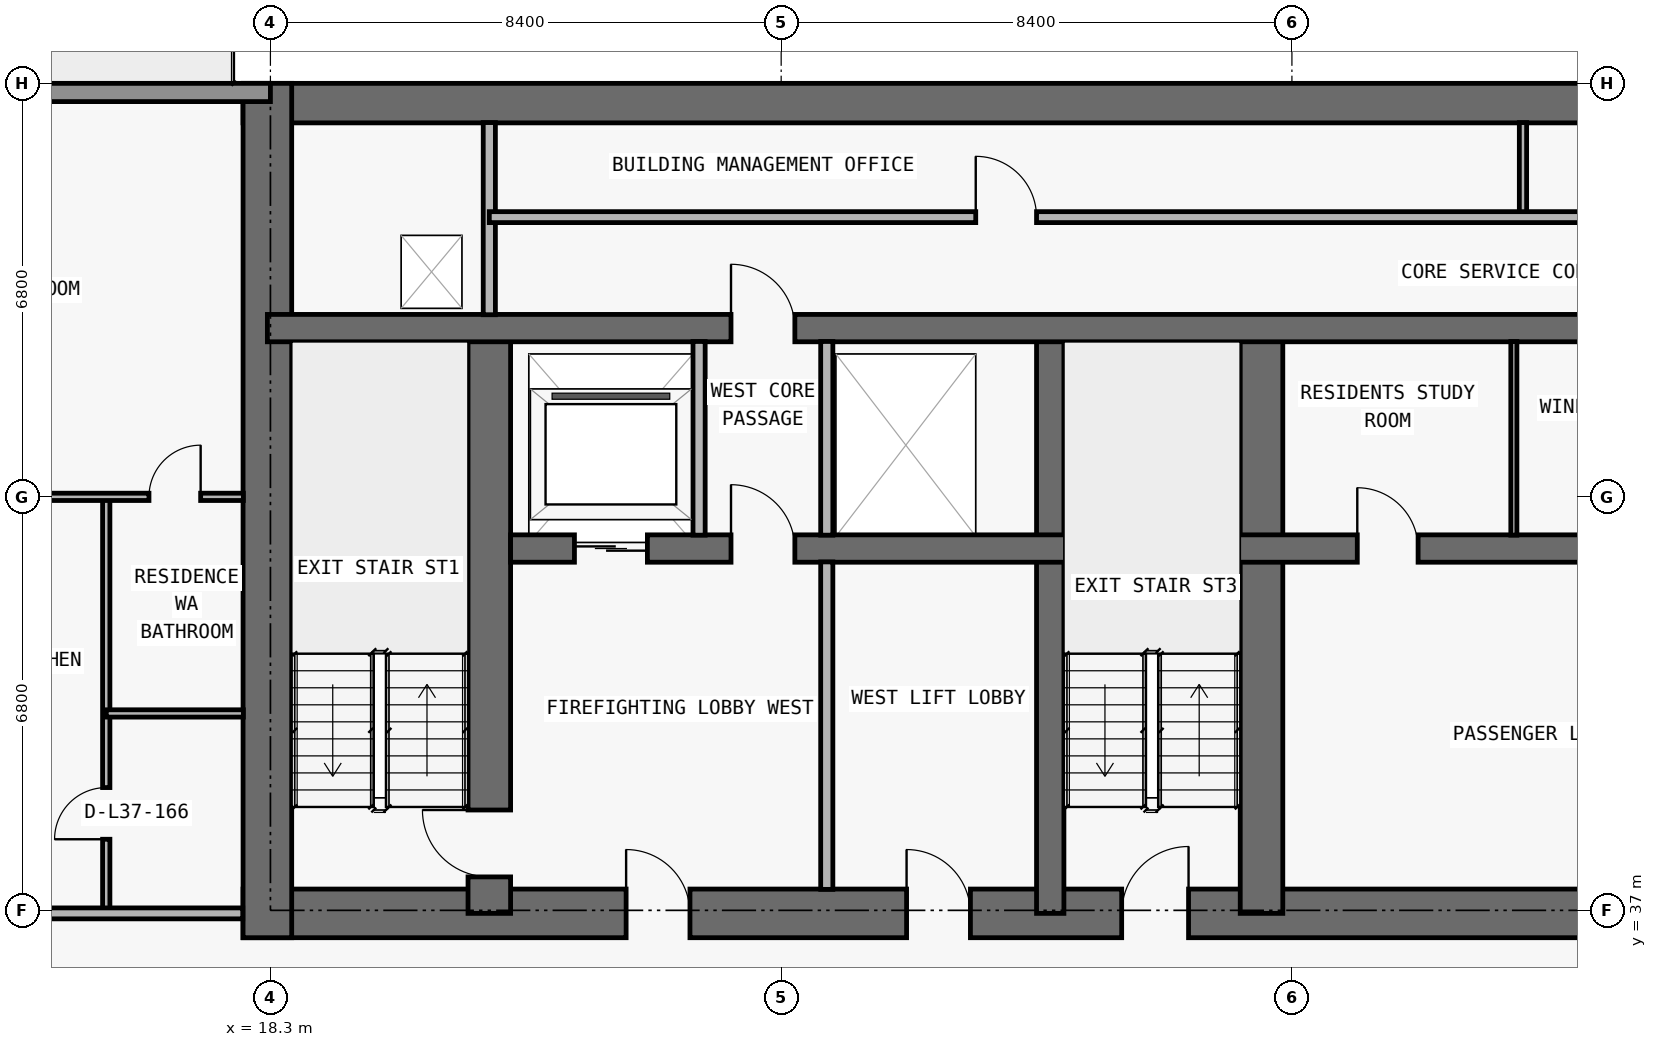
"""IFC4 building model, lengths in metres.
Left out: names, types, materials, properties, quantities, classifications, styles, units other than length and angle.
Written with IfcOpenShell. Run it as: python <this file> out.ifc"""

import sys

from ifc_helpers import new_model, si_unit, direction, frame, frame_2d, origin, place, context, subcontext, project, spatial, rectangle, extrude, element, fill, save


model = new_model("IFC4")
c1 = context("Model", 3, precision=1e-05, world=origin(), true_north=direction((0.0, 1.0)))
c2 = subcontext(c1, "Body", "Model", "MODEL_VIEW")
j1 = project(units=[si_unit("LENGTHUNIT", "METRE"), si_unit("PLANEANGLEUNIT", "RADIAN")], contexts=[c1])
p1 = place(None, origin())
s1 = spatial("IfcSite", under=j1, at=p1, CompositionType="ELEMENT")
p2 = place(p1, origin())
s2 = spatial("IfcBuilding", under=s1, at=p2, CompositionType="ELEMENT")
p3 = place(p2, frame((0.0, 0.0, 135.6)))
s3 = spatial("IfcBuildingStorey", under=s2, at=p3, CompositionType="ELEMENT", Elevation=135.6)
p4 = place(p3, frame((17.85, 36.95, 0.0), z_axis=(0.0, 0.0, 1.0), x_axis=(1.0, 0.0, 0.0)))
e1 = element("IfcWall", 1, at=p4, inside=s3, PredefinedType="SHEAR", context=c2, shape_type="SweptSolid", body=[
    extrude(rectangle(XDim=42.1, YDim=0.8, at=frame_2d((21.05, 0.0))), origin(), (0.0, 0.0, 1.0), 3.05),
])
p5 = place(p4, frame((14.45, 0.0, 0.0)))
e2 = element("IfcOpeningElement", 2, at=p5, cuts=e1, PredefinedType="OPENING", context=c2, shape_type="SweptSolid", body=[
    extrude(rectangle(XDim=1.1, YDim=2.15, at=frame_2d((0.55, 1.075))), frame((0.0, 0.41, 0.0), z_axis=(0.0, -1.0, 0.0), x_axis=(1.0, 0.0, 0.0)), (0.0, 0.0, 1.0), 0.82),
])
p6 = place(p4, frame((6.3, 0.0, 0.0)))
e3 = element("IfcOpeningElement", 3, at=p6, cuts=e1, PredefinedType="OPENING", context=c2, shape_type="SweptSolid", body=[
    extrude(rectangle(XDim=1.05, YDim=2.15, at=frame_2d((0.525, 1.075))), frame((0.0, 0.41, 0.0), z_axis=(0.0, -1.0, 0.0), x_axis=(1.0, 0.0, 0.0)), (0.0, 0.0, 1.0), 0.82),
])
p7 = place(p4, frame((34.8, 0.0, 0.0)))
e4 = element("IfcOpeningElement", 4, at=p7, cuts=e1, PredefinedType="OPENING", context=c2, shape_type="SweptSolid", body=[
    extrude(rectangle(XDim=1.05, YDim=2.15, at=frame_2d((0.525, 1.075))), frame((0.0, 0.41, 0.0), z_axis=(0.0, -1.0, 0.0), x_axis=(1.0, 0.0, 0.0)), (0.0, 0.0, 1.0), 0.82),
])
p8 = place(p4, frame((10.913, 0.0, 0.0)))
e5 = element("IfcOpeningElement", 5, at=p8, cuts=e1, PredefinedType="OPENING", context=c2, shape_type="SweptSolid", body=[
    extrude(rectangle(XDim=1.05, YDim=2.15, at=frame_2d((0.525, 1.075))), frame((0.0, 0.41, 0.0), z_axis=(0.0, -1.0, 0.0), x_axis=(1.0, 0.0, 0.0)), (0.0, 0.0, 1.0), 0.82),
])
p9 = place(p4, frame((24.15, 0.0, 0.0)))
e6 = element("IfcOpeningElement", 6, at=p9, cuts=e1, PredefinedType="OPENING", context=c2, shape_type="SweptSolid", body=[
    extrude(rectangle(XDim=1.05, YDim=2.15, at=frame_2d((0.525, 1.075))), frame((0.0, 0.41, 0.0), z_axis=(0.0, -1.0, 0.0), x_axis=(1.0, 0.0, 0.0)), (0.0, 0.0, 1.0), 0.82),
])
p10 = place(p3, frame((17.85, 50.275, 0.0), z_axis=(0.0, 0.0, 1.0), x_axis=(1.0, 0.0, 0.0)))
e7 = element("IfcWall", 7, at=p10, inside=s3, PredefinedType="SHEAR", context=c2, shape_type="SweptSolid", body=[
    extrude(rectangle(XDim=42.1, YDim=0.65, at=frame_2d((21.05, 0.0))), origin(), (0.0, 0.0, 1.0), 3.05),
])
p11 = place(p3, frame((18.25, 36.55, 0.0), z_axis=(0.0, 0.0, 1.0), x_axis=(0.0, 1.0, 0.0)))
e8 = element("IfcWall", 8, at=p11, inside=s3, PredefinedType="SHEAR", context=c2, shape_type="SweptSolid", body=[
    extrude(rectangle(XDim=14.05, YDim=0.8, at=frame_2d((7.025, 0.0))), origin(), (0.0, 0.0, 1.0), 3.05),
])
p12 = place(p3, frame((21.9, 36.95, 0.0), z_axis=(0.0, 0.0, 1.0), x_axis=(0.0, 1.0, 0.0)))
e9 = element("IfcWall", 9, at=p12, inside=s3, PredefinedType="SHEAR", context=c2, shape_type="SweptSolid", body=[
    extrude(rectangle(XDim=9.625, YDim=0.7, at=frame_2d((4.812, 0.0))), origin(), (0.0, 0.0, 1.0), 3.05),
])
p13 = place(p12, frame((0.6, 0.0, 0.0)))
e10 = element("IfcOpeningElement", 10, at=p13, cuts=e9, PredefinedType="OPENING", context=c2, shape_type="SweptSolid", body=[
    extrude(rectangle(XDim=1.1, YDim=2.15, at=frame_2d((0.55, 1.075))), frame((0.0, 0.36, 0.0), z_axis=(0.0, -1.0, 0.0), x_axis=(1.0, 0.0, 0.0)), (0.0, 0.0, 1.0), 0.72),
])
p14 = place(p3, frame((31.125, 36.95, 0.0), z_axis=(0.0, 0.0, 1.0), x_axis=(0.0, 1.0, 0.0)))
e11 = element("IfcWall", 11, at=p14, inside=s3, PredefinedType="SHEAR", context=c2, shape_type="SweptSolid", body=[
    extrude(rectangle(XDim=9.625, YDim=0.45, at=frame_2d((4.812, 0.0))), origin(), (0.0, 0.0, 1.0), 3.05),
])
p15 = place(p3, frame((34.6, 36.95, 0.0), z_axis=(0.0, 0.0, 1.0), x_axis=(0.0, 1.0, 0.0)))
e12 = element("IfcWall", 12, at=p15, inside=s3, PredefinedType="SHEAR", context=c2, shape_type="SweptSolid", body=[
    extrude(rectangle(XDim=9.625, YDim=0.7, at=frame_2d((4.812, 0.0))), origin(), (0.0, 0.0, 1.0), 3.05),
])
p16 = place(p3, frame((22.25, 42.95, 0.0), z_axis=(0.0, 0.0, 1.0), x_axis=(1.0, 0.0, 0.0)))
e13 = element("IfcWall", 13, at=p16, inside=s3, PredefinedType="SHEAR", context=c2, shape_type="SweptSolid", body=[
    extrude(rectangle(XDim=33.3, YDim=0.45, at=frame_2d((16.65, 0.0))), origin(), (0.0, 0.0, 1.0), 3.05),
])
p17 = place(p16, frame((1.05, 0.0, 0.0)))
e14 = element("IfcOpeningElement", 14, at=p17, cuts=e13, PredefinedType="OPENING", context=c2, shape_type="SweptSolid", body=[
    extrude(rectangle(XDim=1.2, YDim=2.2, at=frame_2d((0.6, 1.1))), frame((0.0, 0.235, 0.0), z_axis=(0.0, -1.0, 0.0), x_axis=(1.0, 0.0, 0.0)), (0.0, 0.0, 1.0), 0.47),
])
p18 = place(p16, frame((31.05, 0.0, 0.0)))
e15 = element("IfcOpeningElement", 15, at=p18, cuts=e13, PredefinedType="OPENING", context=c2, shape_type="SweptSolid", body=[
    extrude(rectangle(XDim=1.2, YDim=2.2, at=frame_2d((0.6, 1.1))), frame((0.0, 0.235, 0.0), z_axis=(0.0, -1.0, 0.0), x_axis=(1.0, 0.0, 0.0)), (0.0, 0.0, 1.0), 0.47),
])
p19 = place(p16, frame((21.4, 0.0, 0.0)))
e16 = element("IfcOpeningElement", 16, at=p19, cuts=e13, PredefinedType="OPENING", context=c2, shape_type="SweptSolid", body=[
    extrude(rectangle(XDim=1.1, YDim=2.2, at=frame_2d((0.55, 1.1))), frame((0.0, 0.235, 0.0), z_axis=(0.0, -1.0, 0.0), x_axis=(1.0, 0.0, 0.0)), (0.0, 0.0, 1.0), 0.47),
])
p20 = place(p16, frame((24.0, 0.0, 0.0)))
e17 = element("IfcOpeningElement", 17, at=p20, cuts=e13, PredefinedType="OPENING", context=c2, shape_type="SweptSolid", body=[
    extrude(rectangle(XDim=1.1, YDim=2.2, at=frame_2d((0.55, 1.1))), frame((0.0, 0.235, 0.0), z_axis=(0.0, -1.0, 0.0), x_axis=(1.0, 0.0, 0.0)), (0.0, 0.0, 1.0), 0.47),
])
p21 = place(p16, frame((3.625, 0.0, 0.0)))
e18 = element("IfcOpeningElement", 18, at=p21, cuts=e13, PredefinedType="OPENING", context=c2, shape_type="SweptSolid", body=[
    extrude(rectangle(XDim=1.05, YDim=2.15, at=frame_2d((0.525, 1.075))), frame((0.0, 0.235, 0.0), z_axis=(0.0, -1.0, 0.0), x_axis=(1.0, 0.0, 0.0)), (0.0, 0.0, 1.0), 0.47),
])
p22 = place(p16, frame((28.675, 0.0, 0.0)))
e19 = element("IfcOpeningElement", 19, at=p22, cuts=e13, PredefinedType="OPENING", context=c2, shape_type="SweptSolid", body=[
    extrude(rectangle(XDim=1.05, YDim=2.15, at=frame_2d((0.525, 1.075))), frame((0.0, 0.235, 0.0), z_axis=(0.0, -1.0, 0.0), x_axis=(1.0, 0.0, 0.0)), (0.0, 0.0, 1.0), 0.47),
])
p23 = place(p16, frame((13.925, 0.0, 0.0)))
e20 = element("IfcOpeningElement", 20, at=p23, cuts=e13, PredefinedType="OPENING", context=c2, shape_type="SweptSolid", body=[
    extrude(rectangle(XDim=1.0, YDim=2.2, at=frame_2d((0.5, 1.1))), frame((0.0, 0.235, 0.0), z_axis=(0.0, -1.0, 0.0), x_axis=(1.0, 0.0, 0.0)), (0.0, 0.0, 1.0), 0.47),
])
p24 = place(p16, frame((18.05, 0.0, 0.0)))
e21 = element("IfcOpeningElement", 21, at=p24, cuts=e13, PredefinedType="OPENING", context=c2, shape_type="SweptSolid", body=[
    extrude(rectangle(XDim=1.0, YDim=2.2, at=frame_2d((0.5, 1.1))), frame((0.0, 0.235, 0.0), z_axis=(0.0, -1.0, 0.0), x_axis=(1.0, 0.0, 0.0)), (0.0, 0.0, 1.0), 0.47),
])
p25 = place(p3, frame((18.25, 46.575, 0.0), z_axis=(0.0, 0.0, 1.0), x_axis=(1.0, 0.0, 0.0)))
e22 = element("IfcWall", 22, at=p25, inside=s3, PredefinedType="SHEAR", context=c2, shape_type="SweptSolid", body=[
    extrude(rectangle(XDim=41.3, YDim=0.45, at=frame_2d((20.65, 0.0))), origin(), (0.0, 0.0, 1.0), 3.05),
])
p26 = place(p25, frame((7.625, 0.0, 0.0)))
e23 = element("IfcOpeningElement", 23, at=p26, cuts=e22, PredefinedType="OPENING", context=c2, shape_type="SweptSolid", body=[
    extrude(rectangle(XDim=1.05, YDim=2.15, at=frame_2d((0.525, 1.075))), frame((0.0, 0.235, 0.0), z_axis=(0.0, -1.0, 0.0), x_axis=(1.0, 0.0, 0.0)), (0.0, 0.0, 1.0), 0.47),
])
p27 = place(p25, frame((32.675, 0.0, 0.0)))
e24 = element("IfcOpeningElement", 24, at=p27, cuts=e22, PredefinedType="OPENING", context=c2, shape_type="SweptSolid", body=[
    extrude(rectangle(XDim=1.05, YDim=2.15, at=frame_2d((0.525, 1.075))), frame((0.0, 0.235, 0.0), z_axis=(0.0, -1.0, 0.0), x_axis=(1.0, 0.0, 0.0)), (0.0, 0.0, 1.0), 0.47),
])
p28 = place(p3, frame((7.7, 50.45, 0.0), z_axis=(0.0, 0.0, 1.0), x_axis=(1.0, 0.0, 0.0)))
e25 = element("IfcWall", 25, at=p28, inside=s3, PredefinedType="STANDARD", context=c2, shape_type="SweptSolid", body=[
    extrude(rectangle(XDim=10.6, YDim=0.3, at=frame_2d((5.3, 0.0))), origin(), (0.0, 0.0, 1.0), 3.05),
])
p29 = place(p28, frame((4.3, 0.0, 0.0)))
e26 = element("IfcOpeningElement", 26, at=p29, cuts=e25, PredefinedType="OPENING", context=c2, shape_type="SweptSolid", body=[
    extrude(rectangle(XDim=2.0, YDim=2.3, at=frame_2d((1.0, 1.15))), frame((0.0, 0.16, 0.0), z_axis=(0.0, -1.0, 0.0), x_axis=(1.0, 0.0, 0.0)), (0.0, 0.0, 1.0), 0.32),
])
p30 = place(p3, frame((15.6, 36.95, 0.0), z_axis=(0.0, 0.0, 1.0), x_axis=(0.0, 1.0, 0.0)))
e27 = element("IfcWall", 27, at=p30, inside=s3, PredefinedType="PARTITIONING", context=c2, shape_type="SweptSolid", body=[
    extrude(rectangle(XDim=6.85, YDim=0.12, at=frame_2d((3.425, 0.0))), origin(), (0.0, 0.0, 1.0), 3.05),
])
p31 = place(p30, frame((1.219, 0.0, 0.0)))
e28 = element("IfcOpeningElement", 28, at=p31, cuts=e27, PredefinedType="OPENING", context=c2, shape_type="SweptSolid", body=[
    extrude(rectangle(XDim=0.85, YDim=2.1, at=frame_2d((0.425, 1.05))), frame((0.0, 0.07, 0.0), z_axis=(0.0, -1.0, 0.0), x_axis=(1.0, 0.0, 0.0)), (0.0, 0.0, 1.0), 0.14),
])
p32 = place(p3, frame((21.9, 46.795, 0.0), z_axis=(0.0, 0.0, 1.0), x_axis=(0.0, 1.0, 0.0)))
e29 = element("IfcWall", 29, at=p32, inside=s3, PredefinedType="PARTITIONING", context=c2, shape_type="SweptSolid", body=[
    extrude(rectangle(XDim=3.16, YDim=0.2, at=frame_2d((1.58, 0.0))), origin(), (0.0, 0.0, 1.0), 3.05),
])
p33 = place(p3, frame((25.35, 43.17, 0.0), z_axis=(0.0, 0.0, 1.0), x_axis=(0.0, 1.0, 0.0)))
e30 = element("IfcWall", 30, at=p33, inside=s3, PredefinedType="PARTITIONING", context=c2, shape_type="SweptSolid", body=[
    extrude(rectangle(XDim=3.185, YDim=0.2, at=frame_2d((1.593, 0.0))), origin(), (0.0, 0.0, 1.0), 3.05),
])
p34 = place(p3, frame((27.45, 37.345, 0.0), z_axis=(0.0, 0.0, 1.0), x_axis=(0.0, 1.0, 0.0)))
e31 = element("IfcWall", 31, at=p34, inside=s3, PredefinedType="PARTITIONING", context=c2, shape_type="SweptSolid", body=[
    extrude(rectangle(XDim=5.385, YDim=0.2, at=frame_2d((2.692, 0.0))), origin(), (0.0, 0.0, 1.0), 3.05),
])
p35 = place(p3, frame((27.45, 43.17, 0.0), z_axis=(0.0, 0.0, 1.0), x_axis=(0.0, 1.0, 0.0)))
e32 = element("IfcWall", 32, at=p35, inside=s3, PredefinedType="PARTITIONING", context=c2, shape_type="SweptSolid", body=[
    extrude(rectangle(XDim=3.185, YDim=0.2, at=frame_2d((1.593, 0.0))), origin(), (0.0, 0.0, 1.0), 3.05),
])
p36 = place(p3, frame((38.75, 43.17, 0.0), z_axis=(0.0, 0.0, 1.0), x_axis=(0.0, 1.0, 0.0)))
e33 = element("IfcWall", 33, at=p36, inside=s3, PredefinedType="MOVABLE", context=c2, shape_type="SweptSolid", body=[
    extrude(rectangle(XDim=3.185, YDim=0.1, at=frame_2d((1.593, 0.0))), origin(), (0.0, 0.0, 1.0), 3.05),
])
p37 = place(p3, frame((38.9, 48.4, 0.0), z_axis=(0.0, 0.0, 1.0), x_axis=(0.0, 1.0, 0.0)))
e34 = element("IfcWall", 34, at=p37, inside=s3, PredefinedType="PARTITIONING", context=c2, shape_type="SweptSolid", body=[
    extrude(rectangle(XDim=1.555, YDim=0.12, at=frame_2d((0.778, 0.0))), origin(), (0.0, 0.0, 1.0), 3.05),
])
p38 = place(p3, frame((7.7, 36.95, 0.0), z_axis=(0.0, 0.0, 1.0), x_axis=(1.0, 0.0, 0.0)))
e35 = element("IfcWall", 35, at=p38, inside=s3, PredefinedType="PARTITIONING", context=c2, shape_type="SweptSolid", body=[
    extrude(rectangle(XDim=10.145, YDim=0.18, at=frame_2d((5.073, 0.0))), origin(), (0.0, 0.0, 1.0), 3.05),
])
p39 = place(p38, frame((5.188, 0.0, 0.0)))
e36 = element("IfcOpeningElement", 36, at=p39, cuts=e35, PredefinedType="OPENING", context=c2, shape_type="SweptSolid", body=[
    extrude(rectangle(XDim=1.0, YDim=2.2, at=frame_2d((0.5, 1.1))), frame((0.0, 0.1, 0.0), z_axis=(0.0, -1.0, 0.0), x_axis=(1.0, 0.0, 0.0)), (0.0, 0.0, 1.0), 0.2),
])
p40 = place(p3, frame((15.6, 40.238, 0.0), z_axis=(0.0, 0.0, 1.0), x_axis=(1.0, 0.0, 0.0)))
e37 = element("IfcWall", 37, at=p40, inside=s3, PredefinedType="PARTITIONING", context=c2, shape_type="SweptSolid", body=[
    extrude(rectangle(XDim=2.255, YDim=0.12, at=frame_2d((1.127, 0.0))), origin(), (0.0, 0.0, 1.0), 3.05),
])
p41 = place(p3, frame((4.195, 43.8, 0.0), z_axis=(0.0, 0.0, 1.0), x_axis=(1.0, 0.0, 0.0)))
e38 = element("IfcWall", 38, at=p41, inside=s3, PredefinedType="PARTITIONING", context=c2, shape_type="SweptSolid", body=[
    extrude(rectangle(XDim=13.66, YDim=0.12, at=frame_2d((6.83, 0.0))), origin(), (0.0, 0.0, 1.0), 2.339),
])
p42 = place(p41, frame((8.743, 0.0, 0.0)))
e39 = element("IfcOpeningElement", 39, at=p42, cuts=e38, PredefinedType="OPENING", context=c2, shape_type="SweptSolid", body=[
    extrude(rectangle(XDim=0.9, YDim=2.15, at=frame_2d((0.45, 1.075))), frame((0.0, 0.07, 0.0), z_axis=(0.0, -1.0, 0.0), x_axis=(1.0, 0.0, 0.0)), (0.0, 0.0, 1.0), 0.14),
])
p43 = place(p41, frame((12.107, 0.0, 0.0)))
e40 = element("IfcOpeningElement", 40, at=p43, cuts=e38, PredefinedType="OPENING", context=c2, shape_type="SweptSolid", body=[
    extrude(rectangle(XDim=0.85, YDim=2.1, at=frame_2d((0.425, 1.05))), frame((0.0, 0.07, 0.0), z_axis=(0.0, -1.0, 0.0), x_axis=(1.0, 0.0, 0.0)), (0.0, 0.0, 1.0), 0.14),
])
p44 = place(p3, frame((21.9, 48.4, 0.0), z_axis=(0.0, 0.0, 1.0), x_axis=(1.0, 0.0, 0.0)))
e41 = element("IfcWall", 41, at=p44, inside=s3, PredefinedType="PARTITIONING", context=c2, shape_type="SweptSolid", body=[
    extrude(rectangle(XDim=33.986, YDim=0.18, at=frame_2d((16.993, 0.0))), origin(), (0.0, 0.0, 1.0), 3.05),
])
p45 = place(p44, frame((8.0, 0.0, 0.0)))
e42 = element("IfcOpeningElement", 42, at=p45, cuts=e41, PredefinedType="OPENING", context=c2, shape_type="SweptSolid", body=[
    extrude(rectangle(XDim=1.0, YDim=2.2, at=frame_2d((0.5, 1.1))), frame((0.0, 0.1, 0.0), z_axis=(0.0, -1.0, 0.0), x_axis=(1.0, 0.0, 0.0)), (0.0, 0.0, 1.0), 0.2),
])
p46 = place(p44, frame((24.993, 0.0, 0.0)))
e43 = element("IfcOpeningElement", 43, at=p46, cuts=e41, PredefinedType="OPENING", context=c2, shape_type="SweptSolid", body=[
    extrude(rectangle(XDim=1.0, YDim=2.2, at=frame_2d((0.5, 1.1))), frame((0.0, 0.1, 0.0), z_axis=(0.0, -1.0, 0.0), x_axis=(1.0, 0.0, 0.0)), (0.0, 0.0, 1.0), 0.2),
])
p47 = place(p17, origin())
e44 = element("IfcDoor", 44, at=p47, inside=s3, OperationType="DOUBLE_DOOR_SLIDING", PredefinedType="DOOR", context=c2, shape_type="SweptSolid", body=[
    extrude(rectangle(XDim=1.2, YDim=2.2, at=frame_2d((0.6, 1.1))), frame((0.0, 0.025, 0.0), z_axis=(0.0, -1.0, 0.0), x_axis=(1.0, 0.0, 0.0)), (0.0, 0.0, 1.0), 0.05),
])
fill(e14, e44)
p48 = place(p5, origin())
e45 = element("IfcDoor", 45, at=p48, inside=s3, OperationType="SINGLE_SWING_RIGHT", PredefinedType="DOOR", context=c2, shape_type="SweptSolid", body=[
    extrude(rectangle(XDim=1.1, YDim=2.15, at=frame_2d((0.55, 1.075))), frame((0.0, 0.025, 0.0), z_axis=(0.0, -1.0, 0.0), x_axis=(1.0, 0.0, 0.0)), (0.0, 0.0, 1.0), 0.05),
])
fill(e2, e45)
p49 = place(p6, origin())
e46 = element("IfcDoor", 46, at=p49, inside=s3, OperationType="SINGLE_SWING_LEFT", PredefinedType="DOOR", context=c2, shape_type="SweptSolid", body=[
    extrude(rectangle(XDim=1.05, YDim=2.15, at=frame_2d((0.525, 1.075))), frame((0.0, 0.025, 0.0), z_axis=(0.0, -1.0, 0.0), x_axis=(1.0, 0.0, 0.0)), (0.0, 0.0, 1.0), 0.05),
])
fill(e3, e46)
p50 = place(p13, origin())
e47 = element("IfcDoor", 47, at=p50, inside=s3, OperationType="SINGLE_SWING_RIGHT", PredefinedType="DOOR", context=c2, shape_type="SweptSolid", body=[
    extrude(rectangle(XDim=1.1, YDim=2.15, at=frame_2d((0.55, 1.075))), frame((0.0, 0.025, 0.0), z_axis=(0.0, -1.0, 0.0), x_axis=(1.0, 0.0, 0.0)), (0.0, 0.0, 1.0), 0.05),
])
fill(e10, e47)
p51 = place(p21, origin())
e48 = element("IfcDoor", 48, at=p51, inside=s3, OperationType="SINGLE_SWING_LEFT", PredefinedType="DOOR", context=c2, shape_type="SweptSolid", body=[
    extrude(rectangle(XDim=1.05, YDim=2.15, at=frame_2d((0.525, 1.075))), frame((0.0, 0.025, 0.0), z_axis=(0.0, -1.0, 0.0), x_axis=(1.0, 0.0, 0.0)), (0.0, 0.0, 1.0), 0.05),
])
fill(e18, e48)
p52 = place(p8, origin())
e49 = element("IfcDoor", 49, at=p52, inside=s3, OperationType="SINGLE_SWING_LEFT", PredefinedType="DOOR", context=c2, shape_type="SweptSolid", body=[
    extrude(rectangle(XDim=1.05, YDim=2.15, at=frame_2d((0.525, 1.075))), frame((0.0, 0.025, 0.0), z_axis=(0.0, -1.0, 0.0), x_axis=(1.0, 0.0, 0.0)), (0.0, 0.0, 1.0), 0.05),
])
fill(e5, e49)
p53 = place(p23, origin())
e50 = element("IfcDoor", 50, at=p53, inside=s3, OperationType="SINGLE_SWING_LEFT", PredefinedType="DOOR", context=c2, shape_type="SweptSolid", body=[
    extrude(rectangle(XDim=1.0, YDim=2.2, at=frame_2d((0.5, 1.1))), frame((0.0, 0.025, 0.0), z_axis=(0.0, -1.0, 0.0), x_axis=(1.0, 0.0, 0.0)), (0.0, 0.0, 1.0), 0.05),
])
fill(e20, e50)
p54 = place(p26, origin())
e51 = element("IfcDoor", 51, at=p54, inside=s3, OperationType="SINGLE_SWING_LEFT", PredefinedType="DOOR", context=c2, shape_type="SweptSolid", body=[
    extrude(rectangle(XDim=1.05, YDim=2.15, at=frame_2d((0.525, 1.075))), frame((0.0, 0.025, 0.0), z_axis=(0.0, -1.0, 0.0), x_axis=(1.0, 0.0, 0.0)), (0.0, 0.0, 1.0), 0.05),
])
fill(e23, e51)
p55 = place(p45, origin())
e52 = element("IfcDoor", 52, at=p55, inside=s3, OperationType="SINGLE_SWING_LEFT", PredefinedType="DOOR", context=c2, shape_type="SweptSolid", body=[
    extrude(rectangle(XDim=1.0, YDim=2.2, at=frame_2d((0.5, 1.1))), frame((0.0, 0.025, 0.0), z_axis=(0.0, -1.0, 0.0), x_axis=(1.0, 0.0, 0.0)), (0.0, 0.0, 1.0), 0.05),
])
fill(e42, e52)
p56 = place(p31, origin())
e53 = element("IfcDoor", 53, at=p56, inside=s3, OperationType="SINGLE_SWING_LEFT", PredefinedType="DOOR", context=c2, shape_type="SweptSolid", body=[
    extrude(rectangle(XDim=0.85, YDim=2.1, at=frame_2d((0.425, 1.05))), frame((0.0, 0.025, 0.0), z_axis=(0.0, -1.0, 0.0), x_axis=(1.0, 0.0, 0.0)), (0.0, 0.0, 1.0), 0.05),
])
fill(e28, e53)
p57 = place(p43, origin())
e54 = element("IfcDoor", 54, at=p57, inside=s3, OperationType="SINGLE_SWING_RIGHT", PredefinedType="DOOR", context=c2, shape_type="SweptSolid", body=[
    extrude(rectangle(XDim=0.85, YDim=2.1, at=frame_2d((0.425, 1.05))), frame((0.0, 0.025, 0.0), z_axis=(0.0, -1.0, 0.0), x_axis=(1.0, 0.0, 0.0)), (0.0, 0.0, 1.0), 0.05),
])
fill(e40, e54)
save(model, sys.argv[1])
